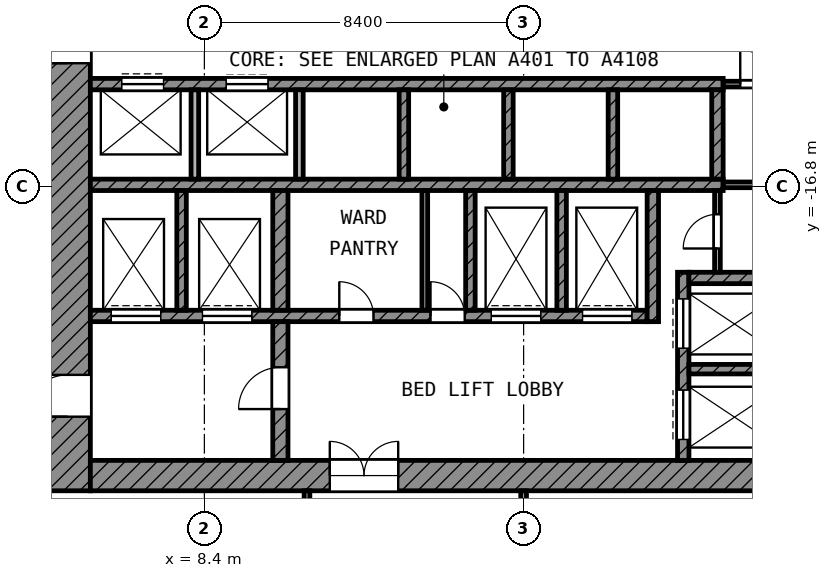
"""IFC4 building model, lengths in metres.
Left out: names, types, materials, properties, quantities, classifications, styles, units other than length and angle.
Written with IfcOpenShell. Run it as: python <this file> out.ifc"""

import sys

from ifc_helpers import new_model, si_unit, direction, frame, frame_2d, origin, place, context, subcontext, project, spatial, rectangle, extrude, element, fill, save


model = new_model("IFC4")
c1 = context("Model", 3, precision=1e-05, world=origin(), true_north=direction((0.0, 1.0)))
c2 = subcontext(c1, "Body", "Model", "MODEL_VIEW")
j1 = project(units=[si_unit("LENGTHUNIT", "METRE"), si_unit("PLANEANGLEUNIT", "RADIAN")], contexts=[c1])
p1 = place(None, origin())
s1 = spatial("IfcSite", under=j1, at=p1, CompositionType="ELEMENT")
p2 = place(p1, origin())
s2 = spatial("IfcBuilding", under=s1, at=p2, CompositionType="ELEMENT")
p3 = place(p2, frame((0.0, 0.0, 222.2)))
s3 = spatial("IfcBuildingStorey", under=s2, at=p3, CompositionType="ELEMENT", Elevation=222.2)
p4 = place(p3, frame((4.8, -24.8, 0.0), z_axis=(0.0, 0.0, 1.0), x_axis=(0.0, 1.0, 0.0)))
e1 = element("IfcWall", 1, at=p4, inside=s3, PredefinedType="SHEAR", context=c2, shape_type="SweptSolid", body=[
    extrude(rectangle(XDim=19.4, YDim=1.2, at=frame_2d((9.7, 0.0))), origin(), (0.0, 0.0, 1.0), 3.6),
])
p5 = place(p4, frame((11.25, 0.0, 0.0)))
e2 = element("IfcOpeningElement", 2, at=p5, cuts=e1, PredefinedType="OPENING", context=c2, shape_type="SweptSolid", body=[
    extrude(rectangle(XDim=1.1, YDim=2.1, at=frame_2d((0.55, 1.05))), frame((0.0, 0.61, 0.0), z_axis=(0.0, -1.0, 0.0), x_axis=(1.0, 0.0, 0.0)), (0.0, 0.0, 1.0), 1.22),
])
p6 = place(p4, frame((1.95, 0.0, 0.0)))
e3 = element("IfcOpeningElement", 3, at=p6, cuts=e1, PredefinedType="OPENING", context=c2, shape_type="SweptSolid", body=[
    extrude(rectangle(XDim=1.1, YDim=2.1, at=frame_2d((0.55, 1.05))), frame((0.0, 0.61, 0.0), z_axis=(0.0, -1.0, 0.0), x_axis=(1.0, 0.0, 0.0)), (0.0, 0.0, 1.0), 1.22),
])
p7 = place(p3, frame((5.4, -24.4, 0.0), z_axis=(0.0, 0.0, 1.0), x_axis=(1.0, 0.0, 0.0)))
e4 = element("IfcWall", 4, at=p7, inside=s3, PredefinedType="SHEAR", context=c2, shape_type="SweptSolid", body=[
    extrude(rectangle(XDim=18.6, YDim=0.8, at=frame_2d((9.3, 0.0))), origin(), (0.0, 0.0, 1.0), 3.6),
])
p8 = place(p7, frame((6.3, 0.0, 0.0)))
e5 = element("IfcOpeningElement", 5, at=p8, cuts=e4, PredefinedType="OPENING", context=c2, shape_type="SweptSolid", body=[
    extrude(rectangle(XDim=1.8, YDim=2.1, at=frame_2d((0.9, 1.05))), frame((0.0, 0.41, 0.0), z_axis=(0.0, -1.0, 0.0), x_axis=(1.0, 0.0, 0.0)), (0.0, 0.0, 1.0), 0.82),
])
p9 = place(p3, frame((5.4, -14.1, 0.0), z_axis=(0.0, 0.0, 1.0), x_axis=(1.0, 0.0, 0.0)))
e6 = element("IfcWall", 6, at=p9, inside=s3, PredefinedType="SHEAR", context=c2, shape_type="SweptSolid", body=[
    extrude(rectangle(XDim=16.65, YDim=0.3, at=frame_2d((8.325, 0.0))), origin(), (0.0, 0.0, 1.0), 3.6),
])
p10 = place(p9, frame((0.825, 0.0, 0.0)))
e7 = element("IfcOpeningElement", 7, at=p10, cuts=e6, PredefinedType="OPENING", context=c2, shape_type="SweptSolid", body=[
    extrude(rectangle(XDim=1.1, YDim=2.1, at=frame_2d((0.55, 1.05))), frame((0.0, 0.16, 0.0), z_axis=(0.0, -1.0, 0.0), x_axis=(1.0, 0.0, 0.0)), (0.0, 0.0, 1.0), 0.32),
])
p11 = place(p9, frame((3.575, 0.0, 0.0)))
e8 = element("IfcOpeningElement", 8, at=p11, cuts=e6, PredefinedType="OPENING", context=c2, shape_type="SweptSolid", body=[
    extrude(rectangle(XDim=1.1, YDim=2.1, at=frame_2d((0.55, 1.05))), frame((0.0, 0.16, 0.0), z_axis=(0.0, -1.0, 0.0), x_axis=(1.0, 0.0, 0.0)), (0.0, 0.0, 1.0), 0.32),
])
p12 = place(p3, frame((5.4, -16.75, 0.0), z_axis=(0.0, 0.0, 1.0), x_axis=(1.0, 0.0, 0.0)))
e9 = element("IfcWall", 9, at=p12, inside=s3, PredefinedType="SHEAR", context=c2, shape_type="SweptSolid", body=[
    extrude(rectangle(XDim=16.65, YDim=0.3, at=frame_2d((8.325, 0.0))), origin(), (0.0, 0.0, 1.0), 3.6),
])
p13 = place(p3, frame((5.4, -20.2, 0.0), z_axis=(0.0, 0.0, 1.0), x_axis=(1.0, 0.0, 0.0)))
e10 = element("IfcWall", 10, at=p13, inside=s3, PredefinedType="SHEAR", context=c2, shape_type="SweptSolid", body=[
    extrude(rectangle(XDim=14.65, YDim=0.3, at=frame_2d((7.325, 0.0))), origin(), (0.0, 0.0, 1.0), 3.6),
])
p14 = place(p13, frame((10.55, 0.0, 0.0)))
e11 = element("IfcOpeningElement", 11, at=p14, cuts=e10, PredefinedType="OPENING", context=c2, shape_type="SweptSolid", body=[
    extrude(rectangle(XDim=1.3, YDim=2.1, at=frame_2d((0.65, 1.05))), frame((0.0, 0.16, 0.0), z_axis=(0.0, -1.0, 0.0), x_axis=(1.0, 0.0, 0.0)), (0.0, 0.0, 1.0), 0.32),
])
p15 = place(p13, frame((12.95, 0.0, 0.0)))
e12 = element("IfcOpeningElement", 12, at=p15, cuts=e10, PredefinedType="OPENING", context=c2, shape_type="SweptSolid", body=[
    extrude(rectangle(XDim=1.3, YDim=2.1, at=frame_2d((0.65, 1.05))), frame((0.0, 0.16, 0.0), z_axis=(0.0, -1.0, 0.0), x_axis=(1.0, 0.0, 0.0)), (0.0, 0.0, 1.0), 0.32),
])
p16 = place(p13, frame((0.55, 0.0, 0.0)))
e13 = element("IfcOpeningElement", 13, at=p16, cuts=e10, PredefinedType="OPENING", context=c2, shape_type="SweptSolid", body=[
    extrude(rectangle(XDim=1.3, YDim=2.1, at=frame_2d((0.65, 1.05))), frame((0.0, 0.16, 0.0), z_axis=(0.0, -1.0, 0.0), x_axis=(1.0, 0.0, 0.0)), (0.0, 0.0, 1.0), 0.32),
])
p17 = place(p13, frame((2.95, 0.0, 0.0)))
e14 = element("IfcOpeningElement", 14, at=p17, cuts=e10, PredefinedType="OPENING", context=c2, shape_type="SweptSolid", body=[
    extrude(rectangle(XDim=1.3, YDim=2.1, at=frame_2d((0.65, 1.05))), frame((0.0, 0.16, 0.0), z_axis=(0.0, -1.0, 0.0), x_axis=(1.0, 0.0, 0.0)), (0.0, 0.0, 1.0), 0.32),
])
p18 = place(p13, frame((6.55, 0.0, 0.0)))
e15 = element("IfcOpeningElement", 15, at=p18, cuts=e10, PredefinedType="OPENING", context=c2, shape_type="SweptSolid", body=[
    extrude(rectangle(XDim=0.9, YDim=2.1, at=frame_2d((0.45, 1.05))), frame((0.0, 0.16, 0.0), z_axis=(0.0, -1.0, 0.0), x_axis=(1.0, 0.0, 0.0)), (0.0, 0.0, 1.0), 0.32),
])
p19 = place(p13, frame((8.95, 0.0, 0.0)))
e16 = element("IfcOpeningElement", 16, at=p19, cuts=e10, PredefinedType="OPENING", context=c2, shape_type="SweptSolid", body=[
    extrude(rectangle(XDim=0.9, YDim=2.1, at=frame_2d((0.45, 1.05))), frame((0.0, 0.16, 0.0), z_axis=(0.0, -1.0, 0.0), x_axis=(1.0, 0.0, 0.0)), (0.0, 0.0, 1.0), 0.32),
])
p20 = place(p3, frame((10.4, -24.0, 0.0), z_axis=(0.0, 0.0, 1.0), x_axis=(0.0, 1.0, 0.0)))
e17 = element("IfcWall", 17, at=p20, inside=s3, PredefinedType="SHEAR", context=c2, shape_type="SweptSolid", body=[
    extrude(rectangle(XDim=3.65, YDim=0.4, at=frame_2d((1.825, 0.0))), origin(), (0.0, 0.0, 1.0), 3.6),
])
p21 = place(p20, frame((1.35, 0.0, 0.0)))
e18 = element("IfcOpeningElement", 18, at=p21, cuts=e17, PredefinedType="OPENING", context=c2, shape_type="SweptSolid", body=[
    extrude(rectangle(XDim=1.1, YDim=2.1, at=frame_2d((0.55, 1.05))), frame((0.0, 0.21, 0.0), z_axis=(0.0, -1.0, 0.0), x_axis=(1.0, 0.0, 0.0)), (0.0, 0.0, 1.0), 0.42),
])
p22 = place(p3, frame((10.4, -20.05, 0.0), z_axis=(0.0, 0.0, 1.0), x_axis=(0.0, 1.0, 0.0)))
e19 = element("IfcWall", 19, at=p22, inside=s3, PredefinedType="SHEAR", context=c2, shape_type="SweptSolid", body=[
    extrude(rectangle(XDim=3.15, YDim=0.4, at=frame_2d((1.575, 0.0))), origin(), (0.0, 0.0, 1.0), 3.6),
])
p23 = place(p3, frame((20.2, -20.35, 0.0), z_axis=(0.0, 0.0, 1.0), x_axis=(0.0, 1.0, 0.0)))
e20 = element("IfcWall", 20, at=p23, inside=s3, PredefinedType="SHEAR", context=c2, shape_type="SweptSolid", body=[
    extrude(rectangle(XDim=3.45, YDim=0.3, at=frame_2d((1.725, 0.0))), origin(), (0.0, 0.0, 1.0), 3.6),
])
p24 = place(p3, frame((21.9, -16.6, 0.0), z_axis=(0.0, 0.0, 1.0), x_axis=(0.0, 1.0, 0.0)))
e21 = element("IfcWall", 21, at=p24, inside=s3, PredefinedType="SHEAR", context=c2, shape_type="SweptSolid", body=[
    extrude(rectangle(XDim=2.35, YDim=0.3, at=frame_2d((1.175, 0.0))), origin(), (0.0, 0.0, 1.0), 3.6),
])
p25 = place(p3, frame((21.15, -19.2, 0.0), z_axis=(0.0, 0.0, 1.0), x_axis=(1.0, 0.0, 0.0)))
e22 = element("IfcWall", 22, at=p25, inside=s3, PredefinedType="SHEAR", context=c2, shape_type="SweptSolid", body=[
    extrude(rectangle(XDim=2.85, YDim=0.3, at=frame_2d((1.425, 0.0))), origin(), (0.0, 0.0, 1.0), 3.6),
])
p26 = place(p3, frame((21.0, -24.0, 0.0), z_axis=(0.0, 0.0, 1.0), x_axis=(0.0, 1.0, 0.0)))
e23 = element("IfcWall", 23, at=p26, inside=s3, PredefinedType="SHEAR", context=c2, shape_type="SweptSolid", body=[
    extrude(rectangle(XDim=4.95, YDim=0.3, at=frame_2d((2.475, 0.0))), origin(), (0.0, 0.0, 1.0), 3.6),
])
p27 = place(p26, frame((2.95, 0.0, 0.0)))
e24 = element("IfcOpeningElement", 24, at=p27, cuts=e23, PredefinedType="OPENING", context=c2, shape_type="SweptSolid", body=[
    extrude(rectangle(XDim=1.3, YDim=2.1, at=frame_2d((0.65, 1.05))), frame((0.0, 0.16, 0.0), z_axis=(0.0, -1.0, 0.0), x_axis=(1.0, 0.0, 0.0)), (0.0, 0.0, 1.0), 0.32),
])
p28 = place(p26, frame((0.55, 0.0, 0.0)))
e25 = element("IfcOpeningElement", 25, at=p28, cuts=e23, PredefinedType="OPENING", context=c2, shape_type="SweptSolid", body=[
    extrude(rectangle(XDim=1.3, YDim=2.1, at=frame_2d((0.65, 1.05))), frame((0.0, 0.16, 0.0), z_axis=(0.0, -1.0, 0.0), x_axis=(1.0, 0.0, 0.0)), (0.0, 0.0, 1.0), 0.32),
])
p29 = place(p3, frame((21.15, -21.6, 0.0), z_axis=(0.0, 0.0, 1.0), x_axis=(1.0, 0.0, 0.0)))
e26 = element("IfcWall", 26, at=p29, inside=s3, PredefinedType="SHEAR", context=c2, shape_type="SweptSolid", body=[
    extrude(rectangle(XDim=2.85, YDim=0.25, at=frame_2d((1.425, 0.0))), origin(), (0.0, 0.0, 1.0), 3.6),
])
for number, where, z_axis, x_axis in (
    (27, (7.8, -20.05, 0.0), (0.0, 0.0, 1.0), (0.0, 1.0, 0.0)),
    (28, (15.4, -20.05, 0.0), (0.0, 0.0, 1.0), (0.0, 1.0, 0.0)),
    (29, (17.8, -20.05, 0.0), (0.0, 0.0, 1.0), (0.0, 1.0, 0.0)),
):
    element("IfcWall", number, at=place(p3, frame(where, z_axis=z_axis, x_axis=x_axis)), inside=s3, PredefinedType="SHEAR", context=c2, shape_type="SweptSolid", body=[
        extrude(rectangle(XDim=3.15, YDim=0.25, at=frame_2d((1.575, 0.0))), origin(), (0.0, 0.0, 1.0), 3.6),
    ])
for number, where, z_axis, x_axis in (
    (30, (8.15, -16.6, 0.0), (0.0, 0.0, 1.0), (0.0, 1.0, 0.0)),
    (31, (10.9, -16.6, 0.0), (0.0, 0.0, 1.0), (0.0, 1.0, 0.0)),
):
    element("IfcWall", number, at=place(p3, frame(where, z_axis=z_axis, x_axis=x_axis)), inside=s3, PredefinedType="PARTITIONING", context=c2, shape_type="SweptSolid", body=[
        extrude(rectangle(XDim=2.35, YDim=0.2, at=frame_2d((1.175, 0.0))), origin(), (0.0, 0.0, 1.0), 3.6),
    ])
for number, where, z_axis, x_axis in (
    (32, (13.65, -16.6, 0.0), (0.0, 0.0, 1.0), (0.0, 1.0, 0.0)),
    (33, (16.4, -16.6, 0.0), (0.0, 0.0, 1.0), (0.0, 1.0, 0.0)),
    (34, (19.15, -16.6, 0.0), (0.0, 0.0, 1.0), (0.0, 1.0, 0.0)),
):
    element("IfcWall", number, at=place(p3, frame(where, z_axis=z_axis, x_axis=x_axis)), inside=s3, PredefinedType="SHEAR", context=c2, shape_type="SweptSolid", body=[
        extrude(rectangle(XDim=2.35, YDim=0.25, at=frame_2d((1.175, 0.0))), origin(), (0.0, 0.0, 1.0), 3.6),
    ])
p30 = place(p3, frame((21.9, -19.05, 0.0), z_axis=(0.0, 0.0, 1.0), x_axis=(0.0, 1.0, 0.0)))
e35 = element("IfcWall", 35, at=p30, inside=s3, PredefinedType="PARTITIONING", context=c2, shape_type="SweptSolid", body=[
    extrude(rectangle(XDim=2.15, YDim=0.15, at=frame_2d((1.075, 0.0))), origin(), (0.0, 0.0, 1.0), 3.6),
])
p31 = place(p30, frame((0.625, 0.0, 0.0)))
e36 = element("IfcOpeningElement", 36, at=p31, cuts=e35, PredefinedType="OPENING", context=c2, shape_type="SweptSolid", body=[
    extrude(rectangle(XDim=0.9, YDim=2.1, at=frame_2d((0.45, 1.05))), frame((0.0, 0.085, 0.0), z_axis=(0.0, -1.0, 0.0), x_axis=(1.0, 0.0, 0.0)), (0.0, 0.0, 1.0), 0.17),
])
p32 = place(p3, frame((22.05, -16.75, 0.0), z_axis=(0.0, 0.0, 1.0), x_axis=(1.0, 0.0, 0.0)))
e37 = element("IfcWall", 37, at=p32, inside=s3, PredefinedType="PARTITIONING", context=c2, shape_type="SweptSolid", body=[
    extrude(rectangle(XDim=1.95, YDim=0.15, at=frame_2d((0.975, 0.0))), origin(), (0.0, 0.0, 1.0), 3.6),
])
p33 = place(p3, frame((22.05, -14.1, 0.0), z_axis=(0.0, 0.0, 1.0), x_axis=(1.0, 0.0, 0.0)))
e38 = element("IfcWall", 38, at=p33, inside=s3, PredefinedType="PARTITIONING", context=c2, shape_type="SweptSolid", body=[
    extrude(rectangle(XDim=1.95, YDim=0.15, at=frame_2d((0.975, 0.0))), origin(), (0.0, 0.0, 1.0), 3.6),
])
p34 = place(p33, frame((0.45, 0.0, 0.0)))
e39 = element("IfcOpeningElement", 39, at=p34, cuts=e38, PredefinedType="OPENING", context=c2, shape_type="SweptSolid", body=[
    extrude(rectangle(XDim=0.9, YDim=2.1, at=frame_2d((0.45, 1.05))), frame((0.0, 0.085, 0.0), z_axis=(0.0, -1.0, 0.0), x_axis=(1.0, 0.0, 0.0)), (0.0, 0.0, 1.0), 0.17),
])
p35 = place(p3, frame((14.2, -20.05, 0.0), z_axis=(0.0, 0.0, 1.0), x_axis=(0.0, 1.0, 0.0)))
e40 = element("IfcWall", 40, at=p35, inside=s3, PredefinedType="PARTITIONING", context=c2, shape_type="SweptSolid", body=[
    extrude(rectangle(XDim=3.15, YDim=0.15, at=frame_2d((1.575, 0.0))), origin(), (0.0, 0.0, 1.0), 3.6),
])
p36 = place(p3, frame((11.1, -29.397, 0.0), z_axis=(0.0, 0.0, 1.0), x_axis=(0.0, 1.0, 0.0)))
e41 = element("IfcWall", 41, at=p36, inside=s3, PredefinedType="PARTITIONING", context=c2, shape_type="SweptSolid", body=[
    extrude(rectangle(XDim=4.597, YDim=0.15, at=frame_2d((2.298, 0.0))), origin(), (0.0, 0.0, 1.0), 3.6),
])
p37 = place(p36, frame((1.647, 0.0, 0.0)))
e42 = element("IfcOpeningElement", 42, at=p37, cuts=e41, PredefinedType="OPENING", context=c2, shape_type="SweptSolid", body=[
    extrude(rectangle(XDim=1.2, YDim=2.1, at=frame_2d((0.6, 1.05))), frame((0.0, 0.085, 0.0), z_axis=(0.0, -1.0, 0.0), x_axis=(1.0, 0.0, 0.0)), (0.0, 0.0, 1.0), 0.17),
])
p38 = place(p3, frame((16.8, -46.12, 0.0), z_axis=(0.0, 0.0, 1.0), x_axis=(0.0, 1.0, 0.0)))
e43 = element("IfcWall", 43, at=p38, inside=s3, PredefinedType="PARTITIONING", context=c2, shape_type="SweptSolid", body=[
    extrude(rectangle(XDim=21.32, YDim=0.15, at=frame_2d((10.66, 0.0))), origin(), (0.0, 0.0, 1.0), 3.6),
])
p39 = place(p38, frame((14.12, 0.0, 0.0)))
e44 = element("IfcOpeningElement", 44, at=p39, cuts=e43, PredefinedType="OPENING", context=c2, shape_type="SweptSolid", body=[
    extrude(rectangle(XDim=1.0, YDim=2.1, at=frame_2d((0.5, 1.05))), frame((0.0, 0.085, 0.0), z_axis=(0.0, -1.0, 0.0), x_axis=(1.0, 0.0, 0.0)), (0.0, 0.0, 1.0), 0.17),
])
p40 = place(p38, frame((9.92, 0.0, 0.0)))
e45 = element("IfcOpeningElement", 45, at=p40, cuts=e43, PredefinedType="OPENING", context=c2, shape_type="SweptSolid", body=[
    extrude(rectangle(XDim=1.0, YDim=2.1, at=frame_2d((0.5, 1.05))), frame((0.0, 0.085, 0.0), z_axis=(0.0, -1.0, 0.0), x_axis=(1.0, 0.0, 0.0)), (0.0, 0.0, 1.0), 0.17),
])
p41 = place(p38, frame((5.02, 0.0, 0.0)))
e46 = element("IfcOpeningElement", 46, at=p41, cuts=e43, PredefinedType="OPENING", context=c2, shape_type="SweptSolid", body=[
    extrude(rectangle(XDim=1.0, YDim=2.1, at=frame_2d((0.5, 1.05))), frame((0.0, 0.085, 0.0), z_axis=(0.0, -1.0, 0.0), x_axis=(1.0, 0.0, 0.0)), (0.0, 0.0, 1.0), 0.17),
])
p42 = place(p38, frame((2.22, 0.0, 0.0)))
e47 = element("IfcOpeningElement", 47, at=p42, cuts=e43, PredefinedType="OPENING", context=c2, shape_type="SweptSolid", body=[
    extrude(rectangle(XDim=1.0, YDim=2.1, at=frame_2d((0.5, 1.05))), frame((0.0, 0.085, 0.0), z_axis=(0.0, -1.0, 0.0), x_axis=(1.0, 0.0, 0.0)), (0.0, 0.0, 1.0), 0.17),
])
p43 = place(p10, origin())
e48 = element("IfcDoor", 48, at=p43, inside=s3, OperationType="DOUBLE_DOOR_SLIDING", PredefinedType="DOOR", context=c2, shape_type="SweptSolid", body=[
    extrude(rectangle(XDim=1.1, YDim=2.1, at=frame_2d((0.55, 1.05))), frame((0.0, 0.025, 0.0), z_axis=(0.0, -1.0, 0.0), x_axis=(1.0, 0.0, 0.0)), (0.0, 0.0, 1.0), 0.05),
])
fill(e7, e48)
p44 = place(p11, origin())
e49 = element("IfcDoor", 49, at=p44, inside=s3, OperationType="DOUBLE_DOOR_SLIDING", PredefinedType="DOOR", context=c2, shape_type="SweptSolid", body=[
    extrude(rectangle(XDim=1.1, YDim=2.1, at=frame_2d((0.55, 1.05))), frame((0.0, 0.025, 0.0), z_axis=(0.0, -1.0, 0.0), x_axis=(1.0, 0.0, 0.0)), (0.0, 0.0, 1.0), 0.05),
])
fill(e8, e49)
p45 = place(p27, origin())
e50 = element("IfcDoor", 50, at=p45, inside=s3, OperationType="DOUBLE_DOOR_SLIDING", PredefinedType="DOOR", context=c2, shape_type="SweptSolid", body=[
    extrude(rectangle(XDim=1.3, YDim=2.1, at=frame_2d((0.65, 1.05))), frame((0.0, 0.025, 0.0), z_axis=(0.0, -1.0, 0.0), x_axis=(1.0, 0.0, 0.0)), (0.0, 0.0, 1.0), 0.05),
])
fill(e24, e50)
p46 = place(p28, origin())
e51 = element("IfcDoor", 51, at=p46, inside=s3, OperationType="DOUBLE_DOOR_SLIDING", PredefinedType="DOOR", context=c2, shape_type="SweptSolid", body=[
    extrude(rectangle(XDim=1.3, YDim=2.1, at=frame_2d((0.65, 1.05))), frame((0.0, 0.025, 0.0), z_axis=(0.0, -1.0, 0.0), x_axis=(1.0, 0.0, 0.0)), (0.0, 0.0, 1.0), 0.05),
])
fill(e25, e51)
p47 = place(p14, origin())
e52 = element("IfcDoor", 52, at=p47, inside=s3, OperationType="DOUBLE_DOOR_SLIDING", PredefinedType="DOOR", context=c2, shape_type="SweptSolid", body=[
    extrude(rectangle(XDim=1.3, YDim=2.1, at=frame_2d((0.65, 1.05))), frame((0.0, 0.025, 0.0), z_axis=(0.0, -1.0, 0.0), x_axis=(1.0, 0.0, 0.0)), (0.0, 0.0, 1.0), 0.05),
])
fill(e11, e52)
p48 = place(p15, origin())
e53 = element("IfcDoor", 53, at=p48, inside=s3, OperationType="DOUBLE_DOOR_SLIDING", PredefinedType="DOOR", context=c2, shape_type="SweptSolid", body=[
    extrude(rectangle(XDim=1.3, YDim=2.1, at=frame_2d((0.65, 1.05))), frame((0.0, 0.025, 0.0), z_axis=(0.0, -1.0, 0.0), x_axis=(1.0, 0.0, 0.0)), (0.0, 0.0, 1.0), 0.05),
])
fill(e12, e53)
p49 = place(p16, origin())
e54 = element("IfcDoor", 54, at=p49, inside=s3, OperationType="DOUBLE_DOOR_SLIDING", PredefinedType="DOOR", context=c2, shape_type="SweptSolid", body=[
    extrude(rectangle(XDim=1.3, YDim=2.1, at=frame_2d((0.65, 1.05))), frame((0.0, 0.025, 0.0), z_axis=(0.0, -1.0, 0.0), x_axis=(1.0, 0.0, 0.0)), (0.0, 0.0, 1.0), 0.05),
])
fill(e13, e54)
p50 = place(p17, origin())
e55 = element("IfcDoor", 55, at=p50, inside=s3, OperationType="DOUBLE_DOOR_SLIDING", PredefinedType="DOOR", context=c2, shape_type="SweptSolid", body=[
    extrude(rectangle(XDim=1.3, YDim=2.1, at=frame_2d((0.65, 1.05))), frame((0.0, 0.025, 0.0), z_axis=(0.0, -1.0, 0.0), x_axis=(1.0, 0.0, 0.0)), (0.0, 0.0, 1.0), 0.05),
])
fill(e14, e55)
p51 = place(p5, origin())
e56 = element("IfcDoor", 56, at=p51, inside=s3, OperationType="SINGLE_SWING_LEFT", PredefinedType="DOOR", context=c2, shape_type="SweptSolid", body=[
    extrude(rectangle(XDim=1.1, YDim=2.1, at=frame_2d((0.55, 1.05))), frame((0.0, 0.025, 0.0), z_axis=(0.0, -1.0, 0.0), x_axis=(1.0, 0.0, 0.0)), (0.0, 0.0, 1.0), 0.05),
])
fill(e2, e56)
p52 = place(p6, origin())
e57 = element("IfcDoor", 57, at=p52, inside=s3, OperationType="SINGLE_SWING_LEFT", PredefinedType="DOOR", context=c2, shape_type="SweptSolid", body=[
    extrude(rectangle(XDim=1.1, YDim=2.1, at=frame_2d((0.55, 1.05))), frame((0.0, 0.025, 0.0), z_axis=(0.0, -1.0, 0.0), x_axis=(1.0, 0.0, 0.0)), (0.0, 0.0, 1.0), 0.05),
])
fill(e3, e57)
p53 = place(p21, origin())
e58 = element("IfcDoor", 58, at=p53, inside=s3, OperationType="SINGLE_SWING_LEFT", PredefinedType="DOOR", context=c2, shape_type="SweptSolid", body=[
    extrude(rectangle(XDim=1.1, YDim=2.1, at=frame_2d((0.55, 1.05))), frame((0.0, 0.025, 0.0), z_axis=(0.0, -1.0, 0.0), x_axis=(1.0, 0.0, 0.0)), (0.0, 0.0, 1.0), 0.05),
])
fill(e18, e58)
p54 = place(p8, origin())
e59 = element("IfcDoor", 59, at=p54, inside=s3, OperationType="DOUBLE_DOOR_SINGLE_SWING", PredefinedType="DOOR", context=c2, shape_type="SweptSolid", body=[
    extrude(rectangle(XDim=1.8, YDim=2.1, at=frame_2d((0.9, 1.05))), frame((0.0, 0.025, 0.0), z_axis=(0.0, -1.0, 0.0), x_axis=(1.0, 0.0, 0.0)), (0.0, 0.0, 1.0), 0.05),
])
fill(e5, e59)
p55 = place(p34, origin())
e60 = element("IfcDoor", 60, at=p55, inside=s3, OperationType="SINGLE_SWING_LEFT", PredefinedType="DOOR", context=c2, shape_type="SweptSolid", body=[
    extrude(rectangle(XDim=0.9, YDim=2.1, at=frame_2d((0.45, 1.05))), frame((0.0, 0.025, 0.0), z_axis=(0.0, -1.0, 0.0), x_axis=(1.0, 0.0, 0.0)), (0.0, 0.0, 1.0), 0.05),
])
fill(e39, e60)
p56 = place(p31, origin())
e61 = element("IfcDoor", 61, at=p56, inside=s3, OperationType="SINGLE_SWING_LEFT", PredefinedType="DOOR", context=c2, shape_type="SweptSolid", body=[
    extrude(rectangle(XDim=0.9, YDim=2.1, at=frame_2d((0.45, 1.05))), frame((0.0, 0.025, 0.0), z_axis=(0.0, -1.0, 0.0), x_axis=(1.0, 0.0, 0.0)), (0.0, 0.0, 1.0), 0.05),
])
fill(e36, e61)
p57 = place(p18, origin())
e62 = element("IfcDoor", 62, at=p57, inside=s3, OperationType="SINGLE_SWING_LEFT", PredefinedType="DOOR", context=c2, shape_type="SweptSolid", body=[
    extrude(rectangle(XDim=0.9, YDim=2.1, at=frame_2d((0.45, 1.05))), frame((0.0, 0.025, 0.0), z_axis=(0.0, -1.0, 0.0), x_axis=(1.0, 0.0, 0.0)), (0.0, 0.0, 1.0), 0.05),
])
fill(e15, e62)
p58 = place(p19, origin())
e63 = element("IfcDoor", 63, at=p58, inside=s3, OperationType="SINGLE_SWING_LEFT", PredefinedType="DOOR", context=c2, shape_type="SweptSolid", body=[
    extrude(rectangle(XDim=0.9, YDim=2.1, at=frame_2d((0.45, 1.05))), frame((0.0, 0.025, 0.0), z_axis=(0.0, -1.0, 0.0), x_axis=(1.0, 0.0, 0.0)), (0.0, 0.0, 1.0), 0.05),
])
fill(e16, e63)
save(model, sys.argv[1])
